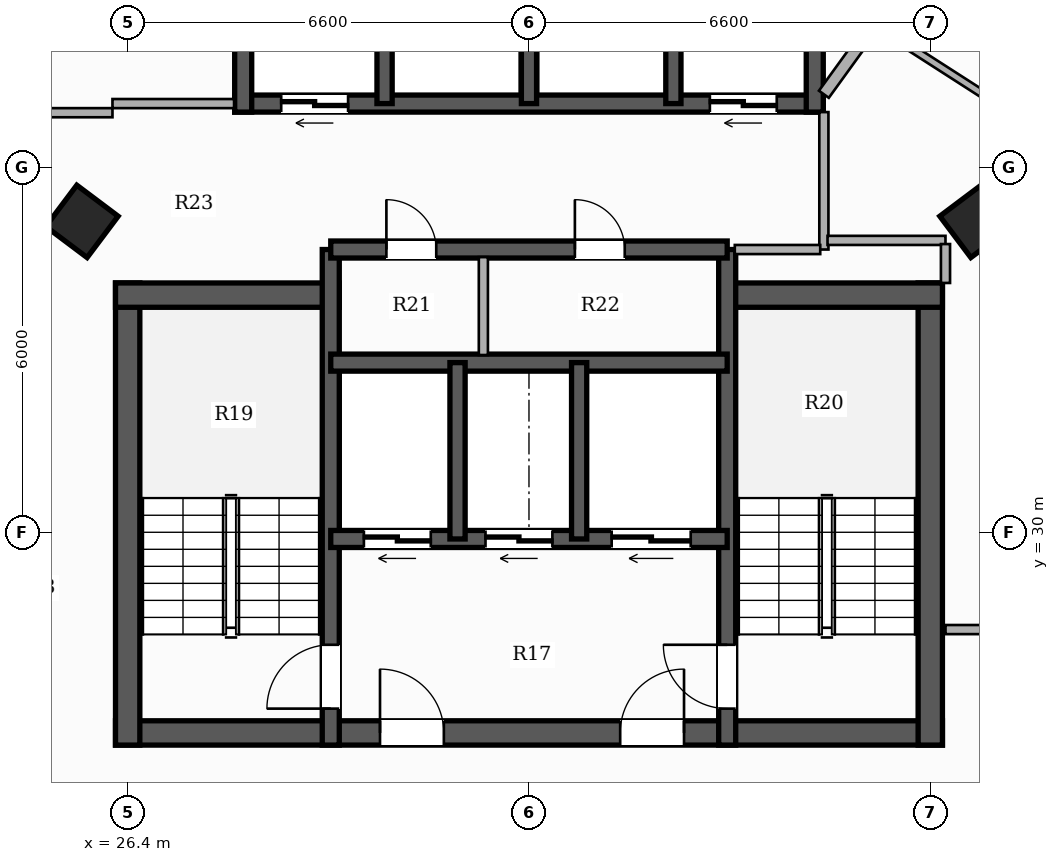
"""IFC4 building model, lengths in metres.
Left out: names, types, materials, properties, quantities, classifications, styles, units other than length and angle.
Written with IfcOpenShell. Run it as: python <this file> out.ifc"""

import sys

from ifc_helpers import new_model, si_unit, direction, frame, frame_2d, origin, origin_2d, place, context, subcontext, project, spatial, rectangle, hollow_rectangle, extrude, element, fill, save


model = new_model("IFC4")
c1 = context("Model", 3, precision=1e-05, world=origin(), true_north=direction((0.0, 1.0)))
c2 = subcontext(c1, "Body", "Model", "MODEL_VIEW")
j1 = project(units=[si_unit("LENGTHUNIT", "METRE"), si_unit("PLANEANGLEUNIT", "RADIAN")], contexts=[c1])
p1 = place(None, origin())
s1 = spatial("IfcSite", under=j1, at=p1, CompositionType="ELEMENT")
p2 = place(p1, origin())
s2 = spatial("IfcBuilding", under=s1, at=p2, CompositionType="ELEMENT")
p3 = place(p2, frame((0.0, 0.0, 170.45)))
s3 = spatial("IfcBuildingStorey", under=s2, at=p3, CompositionType="ELEMENT", Elevation=170.45)
p4 = place(p3, frame((26.2, 26.7, 0.0), z_axis=(0.0, 0.0, 1.0), x_axis=(1.0, 0.0, 0.0)))
e1 = element("IfcWall", 1, at=p4, inside=s3, PredefinedType="SHEAR", context=c2, shape_type="SweptSolid", body=[
    extrude(rectangle(XDim=13.6, YDim=0.4, at=frame_2d((6.8, 0.0))), origin(), (0.0, 0.0, 1.0), 3.3),
])
p5 = place(p4, frame((4.35, 0.0, 0.0)))
e2 = element("IfcOpeningElement", 2, at=p5, cuts=e1, PredefinedType="OPENING", context=c2, shape_type="SweptSolid", body=[
    extrude(rectangle(XDim=1.05, YDim=2.15, at=frame_2d((0.525, 1.075))), frame((0.0, 0.21, 0.0), z_axis=(0.0, -1.0, 0.0), x_axis=(1.0, 0.0, 0.0)), (0.0, 0.0, 1.0), 0.42),
])
p6 = place(p4, frame((8.3, 0.0, 0.0)))
e3 = element("IfcOpeningElement", 3, at=p6, cuts=e1, PredefinedType="OPENING", context=c2, shape_type="SweptSolid", body=[
    extrude(rectangle(XDim=1.05, YDim=2.15, at=frame_2d((0.525, 1.075))), frame((0.0, 0.21, 0.0), z_axis=(0.0, -1.0, 0.0), x_axis=(1.0, 0.0, 0.0)), (0.0, 0.0, 1.0), 0.42),
])
p7 = place(p3, frame((26.4, 26.5, 0.0), z_axis=(0.0, 0.0, 1.0), x_axis=(0.0, 1.0, 0.0)))
e4 = element("IfcWall", 4, at=p7, inside=s3, PredefinedType="SHEAR", context=c2, shape_type="SweptSolid", body=[
    extrude(rectangle(XDim=7.6, YDim=0.4, at=frame_2d((3.8, 0.0))), origin(), (0.0, 0.0, 1.0), 3.3),
])
p8 = place(p3, frame((26.2, 33.9, 0.0), z_axis=(0.0, 0.0, 1.0), x_axis=(1.0, 0.0, 0.0)))
e5 = element("IfcWall", 5, at=p8, inside=s3, PredefinedType="SHEAR", context=c2, shape_type="SweptSolid", body=[
    extrude(rectangle(XDim=3.68, YDim=0.4, at=frame_2d((1.84, 0.0))), origin(), (0.0, 0.0, 1.0), 3.3),
])
p9 = place(p3, frame((39.6, 26.5, 0.0), z_axis=(0.0, 0.0, 1.0), x_axis=(0.0, 1.0, 0.0)))
e6 = element("IfcWall", 6, at=p9, inside=s3, PredefinedType="SHEAR", context=c2, shape_type="SweptSolid", body=[
    extrude(rectangle(XDim=7.6, YDim=0.4, at=frame_2d((3.8, 0.0))), origin(), (0.0, 0.0, 1.0), 3.3),
])
p10 = place(p3, frame((36.12, 33.9, 0.0), z_axis=(0.0, 0.0, 1.0), x_axis=(1.0, 0.0, 0.0)))
e7 = element("IfcWall", 7, at=p10, inside=s3, PredefinedType="SHEAR", context=c2, shape_type="SweptSolid", body=[
    extrude(rectangle(XDim=3.68, YDim=0.4, at=frame_2d((1.84, 0.0))), origin(), (0.0, 0.0, 1.0), 3.3),
])
p11 = place(p3, frame((29.74, 26.5, 0.0), z_axis=(0.0, 0.0, 1.0), x_axis=(0.0, 1.0, 0.0)))
e8 = element("IfcWall", 8, at=p11, inside=s3, PredefinedType="SHEAR", context=c2, shape_type="SweptSolid", body=[
    extrude(rectangle(XDim=8.15, YDim=0.28, at=frame_2d((4.075, 0.0))), origin(), (0.0, 0.0, 1.0), 3.3),
])
p12 = place(p11, frame((0.6, 0.0, 0.0)))
e9 = element("IfcOpeningElement", 9, at=p12, cuts=e8, PredefinedType="OPENING", context=c2, shape_type="SweptSolid", body=[
    extrude(rectangle(XDim=1.05, YDim=2.15, at=frame_2d((0.525, 1.075))), frame((0.0, 0.15, 0.0), z_axis=(0.0, -1.0, 0.0), x_axis=(1.0, 0.0, 0.0)), (0.0, 0.0, 1.0), 0.3),
])
p13 = place(p3, frame((36.26, 26.5, 0.0), z_axis=(0.0, 0.0, 1.0), x_axis=(0.0, 1.0, 0.0)))
e10 = element("IfcWall", 10, at=p13, inside=s3, PredefinedType="SHEAR", context=c2, shape_type="SweptSolid", body=[
    extrude(rectangle(XDim=8.15, YDim=0.28, at=frame_2d((4.075, 0.0))), origin(), (0.0, 0.0, 1.0), 3.3),
])
p14 = place(p13, frame((0.6, 0.0, 0.0)))
e11 = element("IfcOpeningElement", 11, at=p14, cuts=e10, PredefinedType="OPENING", context=c2, shape_type="SweptSolid", body=[
    extrude(rectangle(XDim=1.05, YDim=2.15, at=frame_2d((0.525, 1.075))), frame((0.0, 0.15, 0.0), z_axis=(0.0, -1.0, 0.0), x_axis=(1.0, 0.0, 0.0)), (0.0, 0.0, 1.0), 0.3),
])
p15 = place(p3, frame((36.26, 29.89, 0.0), z_axis=(0.0, 0.0, 1.0), x_axis=(-1.0, 0.0, 0.0)))
e12 = element("IfcWall", 12, at=p15, inside=s3, PredefinedType="SHEAR", context=c2, shape_type="SweptSolid", body=[
    extrude(rectangle(XDim=6.52, YDim=0.28, at=frame_2d((3.26, 0.0))), origin(), (0.0, 0.0, 1.0), 3.3),
])
p16 = place(p15, frame((4.875, 0.0, 0.0)))
e13 = element("IfcOpeningElement", 13, at=p16, cuts=e12, PredefinedType="OPENING", context=c2, shape_type="SweptSolid", body=[
    extrude(rectangle(XDim=1.1, YDim=2.2, at=frame_2d((0.55, 1.1))), frame((0.0, 0.15, 0.0), z_axis=(0.0, -1.0, 0.0), x_axis=(1.0, 0.0, 0.0)), (0.0, 0.0, 1.0), 0.3),
])
p17 = place(p15, frame((2.875, 0.0, 0.0)))
e14 = element("IfcOpeningElement", 14, at=p17, cuts=e12, PredefinedType="OPENING", context=c2, shape_type="SweptSolid", body=[
    extrude(rectangle(XDim=1.1, YDim=2.2, at=frame_2d((0.55, 1.1))), frame((0.0, 0.15, 0.0), z_axis=(0.0, -1.0, 0.0), x_axis=(1.0, 0.0, 0.0)), (0.0, 0.0, 1.0), 0.3),
])
p18 = place(p15, frame((0.6, 0.0, 0.0)))
e15 = element("IfcOpeningElement", 15, at=p18, cuts=e12, PredefinedType="OPENING", context=c2, shape_type="SweptSolid", body=[
    extrude(rectangle(XDim=1.3, YDim=2.2, at=frame_2d((0.65, 1.1))), frame((0.0, 0.15, 0.0), z_axis=(0.0, -1.0, 0.0), x_axis=(1.0, 0.0, 0.0)), (0.0, 0.0, 1.0), 0.3),
])
p19 = place(p3, frame((29.74, 32.79, 0.0), z_axis=(0.0, 0.0, 1.0), x_axis=(1.0, 0.0, 0.0)))
e16 = element("IfcWall", 16, at=p19, inside=s3, PredefinedType="SHEAR", context=c2, shape_type="SweptSolid", body=[
    extrude(rectangle(XDim=6.52, YDim=0.28, at=frame_2d((3.26, 0.0))), origin(), (0.0, 0.0, 1.0), 3.3),
])
for number, where, z_axis, x_axis in (
    (17, (31.825, 29.89, 0.0), (0.0, 0.0, 1.0), (0.0, 1.0, 0.0)),
    (18, (33.825, 29.89, 0.0), (0.0, 0.0, 1.0), (0.0, 1.0, 0.0)),
):
    element("IfcWall", number, at=place(p3, frame(where, z_axis=z_axis, x_axis=x_axis)), inside=s3, PredefinedType="SHEAR", context=c2, shape_type="SweptSolid", body=[
        extrude(rectangle(XDim=2.9, YDim=0.25, at=frame_2d((1.45, 0.0))), origin(), (0.0, 0.0, 1.0), 3.3),
    ])
p20 = place(p3, frame((29.74, 34.65, 0.0), z_axis=(0.0, 0.0, 1.0), x_axis=(1.0, 0.0, 0.0)))
e19 = element("IfcWall", 19, at=p20, inside=s3, PredefinedType="SHEAR", context=c2, shape_type="SweptSolid", body=[
    extrude(rectangle(XDim=6.52, YDim=0.28, at=frame_2d((3.26, 0.0))), origin(), (0.0, 0.0, 1.0), 3.3),
])
p21 = place(p20, frame((0.915, 0.0, 0.0)))
e20 = element("IfcOpeningElement", 20, at=p21, cuts=e19, PredefinedType="OPENING", context=c2, shape_type="SweptSolid", body=[
    extrude(rectangle(XDim=0.82, YDim=2.1, at=frame_2d((0.41, 1.05))), frame((0.0, 0.15, 0.0), z_axis=(0.0, -1.0, 0.0), x_axis=(1.0, 0.0, 0.0)), (0.0, 0.0, 1.0), 0.3),
])
p22 = place(p20, frame((4.015, 0.0, 0.0)))
e21 = element("IfcOpeningElement", 21, at=p22, cuts=e19, PredefinedType="OPENING", context=c2, shape_type="SweptSolid", body=[
    extrude(rectangle(XDim=0.82, YDim=2.1, at=frame_2d((0.41, 1.05))), frame((0.0, 0.15, 0.0), z_axis=(0.0, -1.0, 0.0), x_axis=(1.0, 0.0, 0.0)), (0.0, 0.0, 1.0), 0.3),
])
p23 = place(p3, frame((37.84, 37.05, 0.0), z_axis=(0.0, 0.0, 1.0), x_axis=(-1.0, 0.0, 0.0)))
e22 = element("IfcWall", 22, at=p23, inside=s3, PredefinedType="SHEAR", context=c2, shape_type="SweptSolid", body=[
    extrude(rectangle(XDim=9.68, YDim=0.28, at=frame_2d((4.84, 0.0))), origin(), (0.0, 0.0, 1.0), 3.3),
])
p24 = place(p23, frame((7.815, 0.0, 0.0)))
e23 = element("IfcOpeningElement", 23, at=p24, cuts=e22, PredefinedType="OPENING", context=c2, shape_type="SweptSolid", body=[
    extrude(rectangle(XDim=1.1, YDim=2.2, at=frame_2d((0.55, 1.1))), frame((0.0, 0.15, 0.0), z_axis=(0.0, -1.0, 0.0), x_axis=(1.0, 0.0, 0.0)), (0.0, 0.0, 1.0), 0.3),
])
p25 = place(p23, frame((0.765, 0.0, 0.0)))
e24 = element("IfcOpeningElement", 24, at=p25, cuts=e22, PredefinedType="OPENING", context=c2, shape_type="SweptSolid", body=[
    extrude(rectangle(XDim=1.1, YDim=2.2, at=frame_2d((0.55, 1.1))), frame((0.0, 0.15, 0.0), z_axis=(0.0, -1.0, 0.0), x_axis=(1.0, 0.0, 0.0)), (0.0, 0.0, 1.0), 0.3),
])
for number, where, z_axis, x_axis in (
    (25, (28.3, 36.91, 0.0), (0.0, 0.0, 1.0), (0.0, 1.0, 0.0)),
    (26, (37.7, 36.91, 0.0), (0.0, 0.0, 1.0), (0.0, 1.0, 0.0)),
):
    element("IfcWall", number, at=place(p3, frame(where, z_axis=z_axis, x_axis=x_axis)), inside=s3, PredefinedType="SHEAR", context=c2, shape_type="SweptSolid", body=[
        extrude(rectangle(XDim=2.83, YDim=0.28, at=frame_2d((1.415, 0.0))), origin(), (0.0, 0.0, 1.0), 3.3),
    ])
for number, where, z_axis, x_axis in (
    (27, (30.625, 37.05, 0.0), (0.0, 0.0, 1.0), (0.0, 1.0, 0.0)),
    (28, (33.0, 37.05, 0.0), (0.0, 0.0, 1.0), (0.0, 1.0, 0.0)),
    (29, (35.375, 37.05, 0.0), (0.0, 0.0, 1.0), (0.0, 1.0, 0.0)),
):
    element("IfcWall", number, at=place(p3, frame(where, z_axis=z_axis, x_axis=x_axis)), inside=s3, PredefinedType="SHEAR", context=c2, shape_type="SweptSolid", body=[
        extrude(rectangle(XDim=2.55, YDim=0.25, at=frame_2d((1.275, 0.0))), origin(), (0.0, 0.0, 1.0), 3.3),
    ])
for number, where, z_axis, x_axis in (
    (30, (25.648, 35.113, 0.0), (0.0, 0.0, 1.0), (0.6, 0.8, 0.0)),
    (31, (40.352, 35.113, 0.0), (0.0, 0.0, 1.0), (-0.6, 0.8, 0.0)),
):
    element("IfcColumn", number, at=place(p3, frame(where, z_axis=z_axis, x_axis=x_axis)), inside=s3, PredefinedType="COLUMN", context=c2, shape_type="SweptSolid", body=[
        extrude(hollow_rectangle(XDim=0.85, YDim=0.85, WallThickness=0.028, at=origin_2d()), origin(), (0.0, 0.0, 1.0), 3.3),
    ])
p26 = place(p3, frame((37.85, 34.65, 0.0), z_axis=(0.0, 0.0, 1.0), x_axis=(0.0, 1.0, 0.0)))
e32 = element("IfcWall", 32, at=p26, inside=s3, PredefinedType="PARTITIONING", context=c2, shape_type="SweptSolid", body=[
    extrude(rectangle(XDim=2.26, YDim=0.15, at=frame_2d((1.13, 0.0))), origin(), (0.0, 0.0, 1.0), 3.06),
])
p27 = place(p3, frame((36.385, 34.65, 0.0), z_axis=(0.0, 0.0, 1.0), x_axis=(1.0, 0.0, 0.0)))
e33 = element("IfcWall", 33, at=p27, inside=s3, PredefinedType="PARTITIONING", context=c2, shape_type="SweptSolid", body=[
    extrude(rectangle(XDim=1.405, YDim=0.15, at=frame_2d((0.703, 0.0))), origin(), (0.0, 0.0, 1.0), 2.425),
])
p28 = place(p3, frame((32.25, 32.915, 0.0), z_axis=(0.0, 0.0, 1.0), x_axis=(0.0, 1.0, 0.0)))
e34 = element("IfcWall", 34, at=p28, inside=s3, PredefinedType="PARTITIONING", context=c2, shape_type="SweptSolid", body=[
    extrude(rectangle(XDim=1.61, YDim=0.15, at=frame_2d((0.805, 0.0))), origin(), (0.0, 0.0, 1.0), 3.06),
])
p29 = place(p3, frame((23.56, 36.9, 0.0), z_axis=(0.0, 0.0, 1.0), x_axis=(1.0, 0.0, 0.0)))
e35 = element("IfcWall", 35, at=p29, inside=s3, PredefinedType="PARTITIONING", context=c2, shape_type="SweptSolid", body=[
    extrude(rectangle(XDim=2.59, YDim=0.15, at=frame_2d((1.295, 0.0))), origin(), (0.0, 0.0, 1.0), 2.413),
])
p30 = place(p29, frame((0.515, 0.0, 0.0)))
e36 = element("IfcOpeningElement", 36, at=p30, cuts=e35, PredefinedType="OPENING", context=c2, shape_type="SweptSolid", body=[
    extrude(rectangle(XDim=0.88, YDim=2.1, at=frame_2d((0.44, 1.05))), frame((0.0, 0.085, 0.0), z_axis=(0.0, -1.0, 0.0), x_axis=(1.0, 0.0, 0.0)), (0.0, 0.0, 1.0), 0.17),
])
p31 = place(p3, frame((39.85, 28.4, 0.0), z_axis=(0.0, 0.0, 1.0), x_axis=(1.0, 0.0, 0.0)))
e37 = element("IfcWall", 37, at=p31, inside=s3, PredefinedType="PARTITIONING", context=c2, shape_type="SweptSolid", body=[
    extrude(rectangle(XDim=2.5, YDim=0.15, at=frame_2d((1.25, 0.0))), origin(), (0.0, 0.0, 1.0), 2.721),
])
p32 = place(p3, frame((26.15, 37.05, 0.0), z_axis=(0.0, 0.0, 1.0), x_axis=(1.0, 0.0, 0.0)))
e38 = element("IfcWall", 38, at=p32, inside=s3, PredefinedType="PARTITIONING", context=c2, shape_type="SweptSolid", body=[
    extrude(rectangle(XDim=2.0, YDim=0.15, at=frame_2d((1.0, 0.0))), origin(), (0.0, 0.0, 1.0), 2.413),
])
p33 = place(p3, frame((37.91, 34.8, 0.0), z_axis=(0.0, 0.0, 1.0), x_axis=(1.0, 0.0, 0.0)))
e39 = element("IfcWall", 39, at=p33, inside=s3, PredefinedType="PARTITIONING", context=c2, shape_type="SweptSolid", body=[
    extrude(rectangle(XDim=1.94, YDim=0.15, at=frame_2d((0.97, 0.0))), origin(), (0.0, 0.0, 1.0), 2.721),
])
p34 = place(p3, frame((39.85, 34.74, 0.0), z_axis=(0.0, 0.0, 1.0), x_axis=(0.0, -1.0, 0.0)))
e40 = element("IfcWall", 40, at=p34, inside=s3, PredefinedType="PARTITIONING", context=c2, shape_type="SweptSolid", body=[
    extrude(rectangle(XDim=0.64, YDim=0.15, at=frame_2d((0.32, 0.0))), origin(), (0.0, 0.0, 1.0), 2.721),
])
p35 = place(p3, frame((37.85, 37.203, 0.0), z_axis=(0.0, 0.0, 1.0), x_axis=(0.586236886407, 0.810139687348, 0.0)))
e41 = element("IfcWall", 41, at=p35, inside=s3, PredefinedType="PARTITIONING", context=c2, shape_type="SweptSolid", body=[
    extrude(rectangle(XDim=4.048, YDim=0.2, at=frame_2d((2.024, 0.0))), origin(), (0.0, 0.0, 1.0), 2.413),
])
p36 = place(p3, frame((38.752, 38.305, 0.0), z_axis=(0.0, 0.0, 1.0), x_axis=(0.84140799898, -0.54040038791, 0.0)))
e42 = element("IfcWall", 42, at=p36, inside=s3, PredefinedType="PARTITIONING", context=c2, shape_type="SweptSolid", body=[
    extrude(rectangle(XDim=7.013, YDim=0.12, at=frame_2d((3.507, 0.0))), origin(), (0.0, 0.0, 1.0), 2.413),
])
p37 = place(p36, frame((3.816, 0.0, 0.0)))
e43 = element("IfcOpeningElement", 43, at=p37, cuts=e42, PredefinedType="OPENING", context=c2, shape_type="SweptSolid", body=[
    extrude(rectangle(XDim=0.88, YDim=2.1, at=frame_2d((0.44, 1.05))), frame((0.0, 0.07, 0.0), z_axis=(0.0, -1.0, 0.0), x_axis=(1.0, 0.0, 0.0)), (0.0, 0.0, 1.0), 0.14),
])
p38 = place(p12, origin())
e44 = element("IfcDoor", 44, at=p38, inside=s3, OperationType="SINGLE_SWING_LEFT", PredefinedType="DOOR", context=c2, shape_type="SweptSolid", body=[
    extrude(rectangle(XDim=1.05, YDim=2.15, at=frame_2d((0.525, 1.075))), frame((0.0, 0.025, 0.0), z_axis=(0.0, -1.0, 0.0), x_axis=(1.0, 0.0, 0.0)), (0.0, 0.0, 1.0), 0.05),
])
fill(e9, e44)
p39 = place(p14, origin())
e45 = element("IfcDoor", 45, at=p39, inside=s3, OperationType="SINGLE_SWING_RIGHT", PredefinedType="DOOR", context=c2, shape_type="SweptSolid", body=[
    extrude(rectangle(XDim=1.05, YDim=2.15, at=frame_2d((0.525, 1.075))), frame((0.0, 0.025, 0.0), z_axis=(0.0, -1.0, 0.0), x_axis=(1.0, 0.0, 0.0)), (0.0, 0.0, 1.0), 0.05),
])
fill(e11, e45)
p40 = place(p5, origin())
e46 = element("IfcDoor", 46, at=p40, inside=s3, OperationType="SINGLE_SWING_LEFT", PredefinedType="DOOR", context=c2, shape_type="SweptSolid", body=[
    extrude(rectangle(XDim=1.05, YDim=2.15, at=frame_2d((0.525, 1.075))), frame((0.0, 0.025, 0.0), z_axis=(0.0, -1.0, 0.0), x_axis=(1.0, 0.0, 0.0)), (0.0, 0.0, 1.0), 0.05),
])
fill(e2, e46)
p41 = place(p6, origin())
e47 = element("IfcDoor", 47, at=p41, inside=s3, OperationType="SINGLE_SWING_RIGHT", PredefinedType="DOOR", context=c2, shape_type="SweptSolid", body=[
    extrude(rectangle(XDim=1.05, YDim=2.15, at=frame_2d((0.525, 1.075))), frame((0.0, 0.025, 0.0), z_axis=(0.0, -1.0, 0.0), x_axis=(1.0, 0.0, 0.0)), (0.0, 0.0, 1.0), 0.05),
])
fill(e3, e47)
p42 = place(p16, origin())
e48 = element("IfcDoor", 48, at=p42, inside=s3, OperationType="DOUBLE_DOOR_SLIDING", PredefinedType="DOOR", context=c2, shape_type="SweptSolid", body=[
    extrude(rectangle(XDim=1.1, YDim=2.2, at=frame_2d((0.55, 1.1))), frame((0.0, 0.025, 0.0), z_axis=(0.0, -1.0, 0.0), x_axis=(1.0, 0.0, 0.0)), (0.0, 0.0, 1.0), 0.05),
])
fill(e13, e48)
p43 = place(p17, origin())
e49 = element("IfcDoor", 49, at=p43, inside=s3, OperationType="DOUBLE_DOOR_SLIDING", PredefinedType="DOOR", context=c2, shape_type="SweptSolid", body=[
    extrude(rectangle(XDim=1.1, YDim=2.2, at=frame_2d((0.55, 1.1))), frame((0.0, 0.025, 0.0), z_axis=(0.0, -1.0, 0.0), x_axis=(1.0, 0.0, 0.0)), (0.0, 0.0, 1.0), 0.05),
])
fill(e14, e49)
p44 = place(p18, origin())
e50 = element("IfcDoor", 50, at=p44, inside=s3, OperationType="DOUBLE_DOOR_SLIDING", PredefinedType="DOOR", context=c2, shape_type="SweptSolid", body=[
    extrude(rectangle(XDim=1.3, YDim=2.2, at=frame_2d((0.65, 1.1))), frame((0.0, 0.025, 0.0), z_axis=(0.0, -1.0, 0.0), x_axis=(1.0, 0.0, 0.0)), (0.0, 0.0, 1.0), 0.05),
])
fill(e15, e50)
p45 = place(p24, origin())
e51 = element("IfcDoor", 51, at=p45, inside=s3, OperationType="DOUBLE_DOOR_SLIDING", PredefinedType="DOOR", context=c2, shape_type="SweptSolid", body=[
    extrude(rectangle(XDim=1.1, YDim=2.2, at=frame_2d((0.55, 1.1))), frame((0.0, 0.025, 0.0), z_axis=(0.0, -1.0, 0.0), x_axis=(1.0, 0.0, 0.0)), (0.0, 0.0, 1.0), 0.05),
])
fill(e23, e51)
p46 = place(p25, origin())
e52 = element("IfcDoor", 52, at=p46, inside=s3, OperationType="DOUBLE_DOOR_SLIDING", PredefinedType="DOOR", context=c2, shape_type="SweptSolid", body=[
    extrude(rectangle(XDim=1.1, YDim=2.2, at=frame_2d((0.55, 1.1))), frame((0.0, 0.025, 0.0), z_axis=(0.0, -1.0, 0.0), x_axis=(1.0, 0.0, 0.0)), (0.0, 0.0, 1.0), 0.05),
])
fill(e24, e52)
p47 = place(p21, origin())
e53 = element("IfcDoor", 53, at=p47, inside=s3, OperationType="SINGLE_SWING_LEFT", PredefinedType="DOOR", context=c2, shape_type="SweptSolid", body=[
    extrude(rectangle(XDim=0.82, YDim=2.1, at=frame_2d((0.41, 1.05))), frame((0.0, 0.025, 0.0), z_axis=(0.0, -1.0, 0.0), x_axis=(1.0, 0.0, 0.0)), (0.0, 0.0, 1.0), 0.05),
])
fill(e20, e53)
p48 = place(p22, origin())
e54 = element("IfcDoor", 54, at=p48, inside=s3, OperationType="SINGLE_SWING_LEFT", PredefinedType="DOOR", context=c2, shape_type="SweptSolid", body=[
    extrude(rectangle(XDim=0.82, YDim=2.1, at=frame_2d((0.41, 1.05))), frame((0.0, 0.025, 0.0), z_axis=(0.0, -1.0, 0.0), x_axis=(1.0, 0.0, 0.0)), (0.0, 0.0, 1.0), 0.05),
])
fill(e21, e54)
save(model, sys.argv[1])
